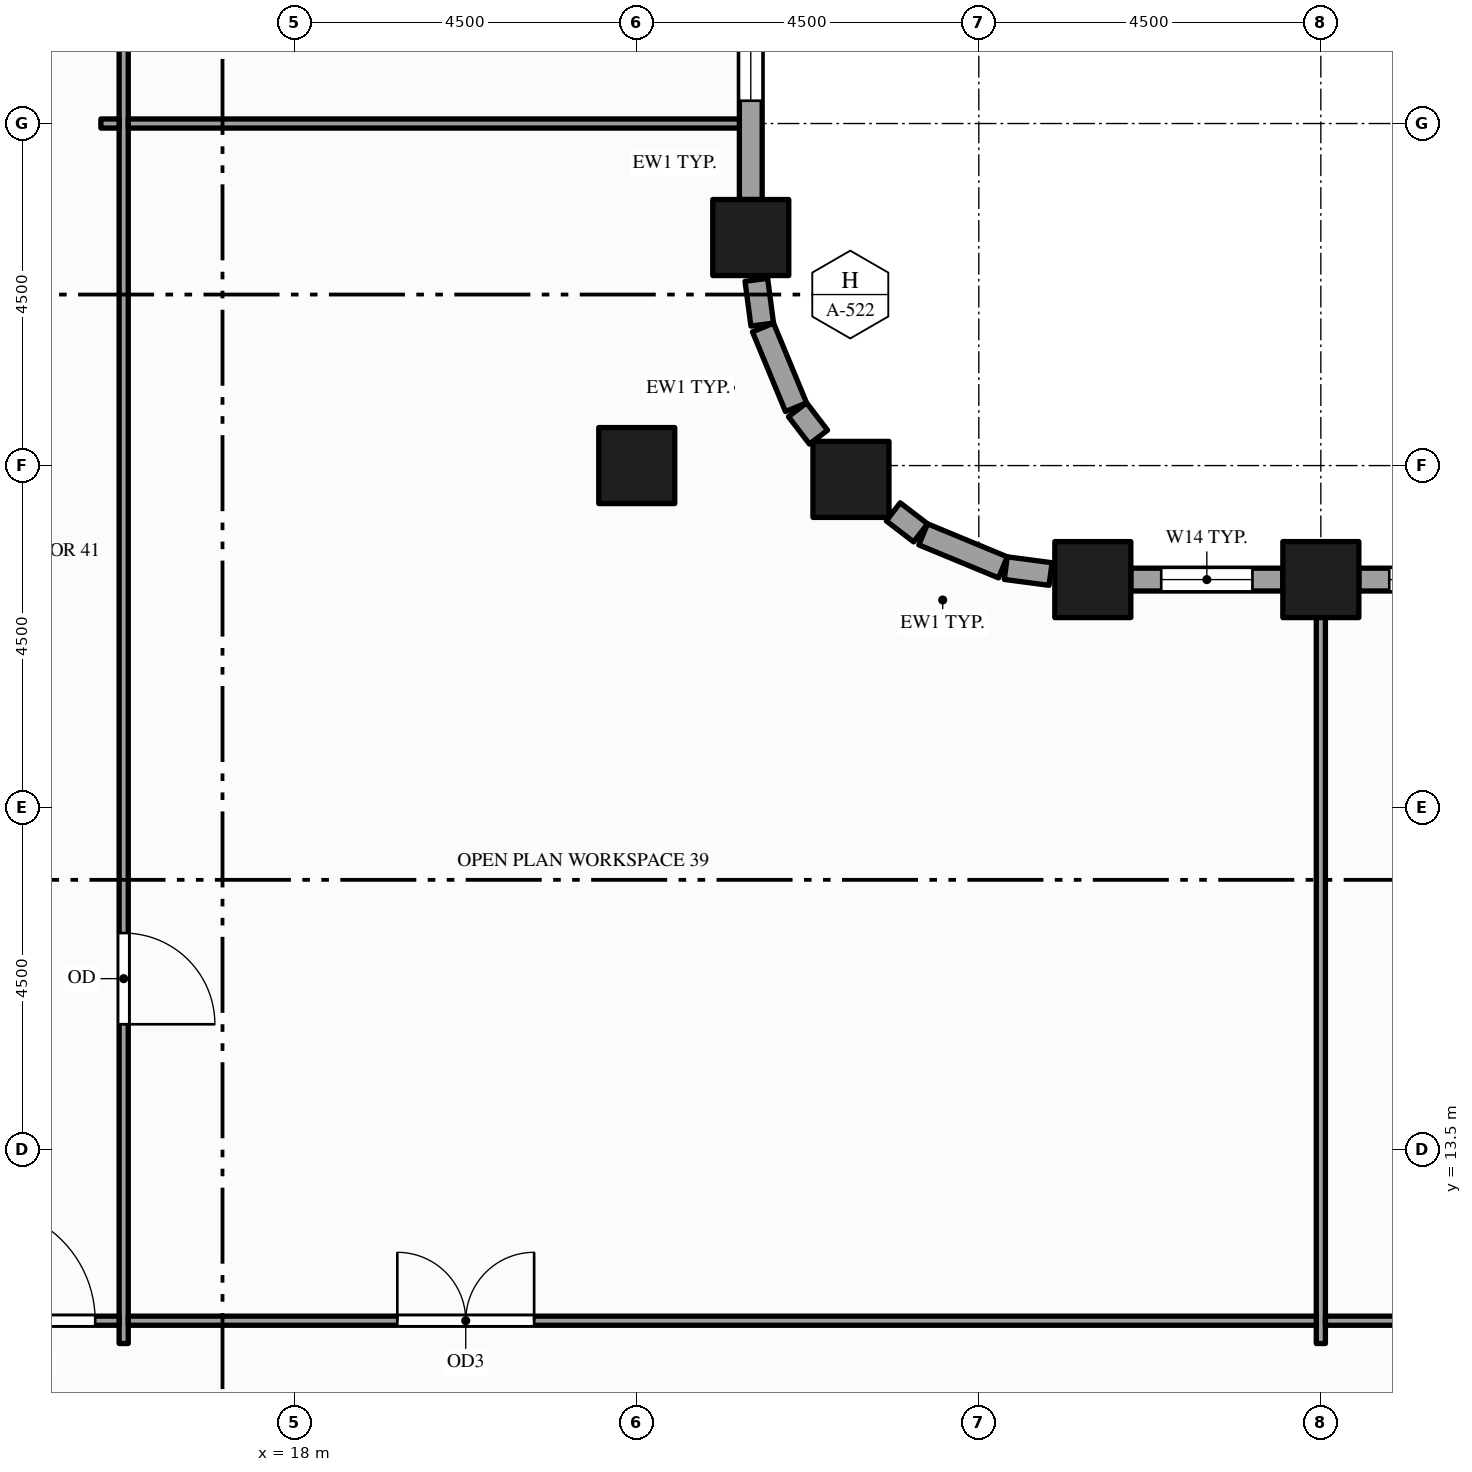
"""IFC4 building model, lengths in metres.
Left out: names, types, materials, properties, quantities, classifications, styles, units other than length and angle.
Written with IfcOpenShell. Run it as: python <this file> out.ifc"""

import sys

from ifc_helpers import new_model, si_unit, direction, frame, frame_2d, origin, origin_2d, place, context, subcontext, project, spatial, rectangle, hollow_rectangle, extrude, element, fill, save


model = new_model("IFC4")
c1 = context("Model", 3, precision=1e-05, world=origin(), true_north=direction((0.0, 1.0)))
c2 = subcontext(c1, "Body", "Model", "MODEL_VIEW")
j1 = project(units=[si_unit("LENGTHUNIT", "METRE"), si_unit("PLANEANGLEUNIT", "RADIAN")], contexts=[c1])
p1 = place(None, origin())
s1 = spatial("IfcSite", under=j1, at=p1, CompositionType="ELEMENT")
p2 = place(p1, origin())
s2 = spatial("IfcBuilding", under=s1, at=p2, CompositionType="ELEMENT")
p3 = place(p2, frame((0.0, 0.0, 115.0)))
s3 = spatial("IfcBuildingStorey", under=s2, at=p3, CompositionType="ELEMENT", Elevation=115.0)
for number, where, z_axis, x_axis in (
    (1, (22.5, 22.5, -0.15), (0.0, 0.0, 1.0), (1.0, 0.0, 0.0)),
    (2, (24.0, 25.5, -0.15), (0.0, 0.0, 1.0), (1.0, 0.0, 0.0)),
    (3, (25.318, 22.318, -0.15), (0.0, 0.0, 1.0), (1.0, 0.0, 0.0)),
    (4, (28.5, 21.0, -0.15), (0.0, 0.0, 1.0), (1.0, 0.0, 0.0)),
    (5, (31.5, 21.0, -0.15), (0.0, 0.0, 1.0), (1.0, 0.0, 0.0)),
):
    element("IfcColumn", number, at=place(p3, frame(where, z_axis=z_axis, x_axis=x_axis)), inside=s3, PredefinedType="COLUMN", context=c2, shape_type="SweptSolid", body=[
        extrude(hollow_rectangle(XDim=1.0, YDim=1.0, WallThickness=0.05, at=origin_2d()), origin(), (0.0, 0.0, 1.0), 4.0),
    ])
p4 = place(p3, frame((35.5, 21.0, 0.0), z_axis=(0.0, 0.0, 1.0), x_axis=(-1.0, 0.0, 0.0)))
e6 = element("IfcWall", 6, at=p4, inside=s3, PredefinedType="STANDARD", context=c2, shape_type="SweptSolid", body=[
    extrude(rectangle(XDim=3.5, YDim=0.3, at=frame_2d((1.75, 0.0))), origin(), (0.0, 0.0, 1.0), 3.154),
])
p5 = place(p4, frame((0.4, 0.0, 0.9)))
e7 = element("IfcOpeningElement", 7, at=p5, cuts=e6, PredefinedType="OPENING", context=c2, shape_type="SweptSolid", body=[
    extrude(rectangle(XDim=1.05, YDim=2.0, at=frame_2d((0.525, 1.0))), frame((0.0, 0.16, 0.0), z_axis=(0.0, -1.0, 0.0), x_axis=(1.0, 0.0, 0.0)), (0.0, 0.0, 1.0), 0.32),
])
p6 = place(p4, frame((2.05, 0.0, 0.9)))
e8 = element("IfcOpeningElement", 8, at=p6, cuts=e6, PredefinedType="OPENING", context=c2, shape_type="SweptSolid", body=[
    extrude(rectangle(XDim=1.05, YDim=2.0, at=frame_2d((0.525, 1.0))), frame((0.0, 0.16, 0.0), z_axis=(0.0, -1.0, 0.0), x_axis=(1.0, 0.0, 0.0)), (0.0, 0.0, 1.0), 0.32),
])
p7 = place(p3, frame((31.0, 21.0, 0.0), z_axis=(0.0, 0.0, 1.0), x_axis=(-1.0, 0.0, 0.0)))
e9 = element("IfcWall", 9, at=p7, inside=s3, PredefinedType="STANDARD", context=c2, shape_type="SweptSolid", body=[
    extrude(rectangle(XDim=2.0, YDim=0.3, at=frame_2d((1.0, 0.0))), origin(), (0.0, 0.0, 1.0), 3.154),
])
p8 = place(p7, frame((0.4, 0.0, 0.9)))
e10 = element("IfcOpeningElement", 10, at=p8, cuts=e9, PredefinedType="OPENING", context=c2, shape_type="SweptSolid", body=[
    extrude(rectangle(XDim=1.2, YDim=2.0, at=frame_2d((0.6, 1.0))), frame((0.0, 0.16, 0.0), z_axis=(0.0, -1.0, 0.0), x_axis=(1.0, 0.0, 0.0)), (0.0, 0.0, 1.0), 0.32),
])
p9 = place(p3, frame((27.944, 21.073, 0.0), z_axis=(0.0, 0.0, 1.0), x_axis=(-0.991420685839, 0.130709692412, 0.0)))
e11 = element("IfcWall", 11, at=p9, inside=s3, PredefinedType="STANDARD", context=c2, shape_type="SweptSolid", body=[
    extrude(rectangle(XDim=0.594, YDim=0.3, at=frame_2d((0.297, 0.0))), origin(), (0.0, 0.0, 1.0), 3.154),
])
p10 = place(p3, frame((27.317, 21.161, 0.0), z_axis=(0.0, 0.0, 1.0), x_axis=(-0.923914616768, 0.382598720491, 0.0)))
e12 = element("IfcWall", 12, at=p10, inside=s3, PredefinedType="STANDARD", context=c2, shape_type="SweptSolid", body=[
    extrude(rectangle(XDim=1.135, YDim=0.3, at=frame_2d((0.568, 0.0))), origin(), (0.0, 0.0, 1.0), 2.938),
])
p11 = place(p3, frame((26.234, 21.615, 0.0), z_axis=(0.0, 0.0, 1.0), x_axis=(-0.793563062559, 0.608488016104, 0.0)))
e13 = element("IfcWall", 13, at=p11, inside=s3, PredefinedType="STANDARD", context=c2, shape_type="SweptSolid", body=[
    extrude(rectangle(XDim=0.454, YDim=0.3, at=frame_2d((0.227, 0.0))), origin(), (0.0, 0.0, 1.0), 3.154),
])
p12 = place(p3, frame((24.891, 22.874, 0.0), z_axis=(0.0, 0.0, 1.0), x_axis=(-0.608488016104, 0.793563062559, 0.0)))
e14 = element("IfcWall", 14, at=p12, inside=s3, PredefinedType="STANDARD", context=c2, shape_type="SweptSolid", body=[
    extrude(rectangle(XDim=0.454, YDim=0.3, at=frame_2d((0.227, 0.0))), origin(), (0.0, 0.0, 1.0), 2.76),
])
p13 = place(p3, frame((24.595, 23.268, 0.0), z_axis=(0.0, 0.0, 1.0), x_axis=(-0.382598720491, 0.923914616768, 0.0)))
e15 = element("IfcWall", 15, at=p13, inside=s3, PredefinedType="STANDARD", context=c2, shape_type="SweptSolid", body=[
    extrude(rectangle(XDim=1.135, YDim=0.3, at=frame_2d((0.568, 0.0))), origin(), (0.0, 0.0, 1.0), 3.154),
])
p14 = place(p3, frame((24.151, 24.355, 0.0), z_axis=(0.0, 0.0, 1.0), x_axis=(-0.130709692412, 0.991420685839, 0.0)))
e16 = element("IfcWall", 16, at=p14, inside=s3, PredefinedType="STANDARD", context=c2, shape_type="SweptSolid", body=[
    extrude(rectangle(XDim=0.594, YDim=0.3, at=frame_2d((0.297, 0.0))), origin(), (0.0, 0.0, 1.0), 3.154),
])
p15 = place(p3, frame((24.0, 26.0, 0.0), z_axis=(0.0, 0.0, 1.0), x_axis=(0.0, 1.0, 0.0)))
e17 = element("IfcWall", 17, at=p15, inside=s3, PredefinedType="STANDARD", context=c2, shape_type="SweptSolid", body=[
    extrude(rectangle(XDim=5.0, YDim=0.3, at=frame_2d((2.5, 0.0))), origin(), (0.0, 0.0, 1.0), 3.154),
])
p16 = place(p15, frame((1.3, 0.0, 0.9)))
e18 = element("IfcOpeningElement", 18, at=p16, cuts=e17, PredefinedType="OPENING", context=c2, shape_type="SweptSolid", body=[
    extrude(rectangle(XDim=1.65, YDim=2.0, at=frame_2d((0.825, 1.0))), frame((0.0, 0.16, 0.0), z_axis=(0.0, -1.0, 0.0), x_axis=(1.0, 0.0, 0.0)), (0.0, 0.0, 1.0), 0.32),
])
p17 = place(p15, frame((3.55, 0.0, 0.9)))
e19 = element("IfcOpeningElement", 19, at=p17, cuts=e17, PredefinedType="OPENING", context=c2, shape_type="SweptSolid", body=[
    extrude(rectangle(XDim=1.05, YDim=2.0, at=frame_2d((0.525, 1.0))), frame((0.0, 0.16, 0.0), z_axis=(0.0, -1.0, 0.0), x_axis=(1.0, 0.0, 0.0)), (0.0, 0.0, 1.0), 0.32),
])
p18 = place(p3, frame((15.75, 10.95, 0.0), z_axis=(0.0, 0.0, 1.0), x_axis=(0.0, 1.0, 0.0)))
e20 = element("IfcWall", 20, at=p18, inside=s3, PredefinedType="PARTITIONING", context=c2, shape_type="SweptSolid", body=[
    extrude(rectangle(XDim=20.85, YDim=0.12, at=frame_2d((10.425, 0.0))), origin(), (0.0, 0.0, 1.0), 2.6),
])
p19 = place(p18, frame((17.8, 0.0, 0.0)))
e21 = element("IfcOpeningElement", 21, at=p19, cuts=e20, PredefinedType="OPENING", context=c2, shape_type="SweptSolid", body=[
    extrude(rectangle(XDim=1.0, YDim=2.1, at=frame_2d((0.5, 1.05))), frame((0.0, 0.07, 0.0), z_axis=(0.0, -1.0, 0.0), x_axis=(1.0, 0.0, 0.0)), (0.0, 0.0, 1.0), 0.14),
])
p20 = place(p18, frame((4.2, 0.0, 0.0)))
e22 = element("IfcOpeningElement", 22, at=p20, cuts=e20, PredefinedType="OPENING", context=c2, shape_type="SweptSolid", body=[
    extrude(rectangle(XDim=1.2, YDim=2.1, at=frame_2d((0.6, 1.05))), frame((0.0, 0.07, 0.0), z_axis=(0.0, -1.0, 0.0), x_axis=(1.0, 0.0, 0.0)), (0.0, 0.0, 1.0), 0.14),
])
p21 = place(p3, frame((31.5, 10.95, 0.0), z_axis=(0.0, 0.0, 1.0), x_axis=(0.0, 1.0, 0.0)))
e23 = element("IfcWall", 23, at=p21, inside=s3, PredefinedType="PARTITIONING", context=c2, shape_type="SweptSolid", body=[
    extrude(rectangle(XDim=9.9, YDim=0.12, at=frame_2d((4.95, 0.0))), origin(), (0.0, 0.0, 1.0), 2.938),
])
p22 = place(p3, frame((13.56, 11.25, 0.0), z_axis=(0.0, 0.0, 1.0), x_axis=(1.0, 0.0, 0.0)))
e24 = element("IfcWall", 24, at=p22, inside=s3, PredefinedType="PARTITIONING", context=c2, shape_type="SweptSolid", body=[
    extrude(rectangle(XDim=2.13, YDim=0.12, at=frame_2d((1.065, 0.0))), origin(), (0.0, 0.0, 1.0), 2.938),
])
p23 = place(p22, frame((0.315, 0.0, 0.0)))
e25 = element("IfcOpeningElement", 25, at=p23, cuts=e24, PredefinedType="OPENING", context=c2, shape_type="SweptSolid", body=[
    extrude(rectangle(XDim=1.5, YDim=2.1, at=frame_2d((0.75, 1.05))), frame((0.0, 0.07, 0.0), z_axis=(0.0, -1.0, 0.0), x_axis=(1.0, 0.0, 0.0)), (0.0, 0.0, 1.0), 0.14),
])
p24 = place(p3, frame((15.81, 11.25, 0.0), z_axis=(0.0, 0.0, 1.0), x_axis=(1.0, 0.0, 0.0)))
e26 = element("IfcWall", 26, at=p24, inside=s3, PredefinedType="PARTITIONING", context=c2, shape_type="SweptSolid", body=[
    extrude(rectangle(XDim=15.63, YDim=0.12, at=frame_2d((7.815, 0.0))), origin(), (0.0, 0.0, 1.0), 2.76),
])
p25 = place(p24, frame((3.54, 0.0, 0.0)))
e27 = element("IfcOpeningElement", 27, at=p25, cuts=e26, PredefinedType="OPENING", context=c2, shape_type="SweptSolid", body=[
    extrude(rectangle(XDim=1.8, YDim=2.1, at=frame_2d((0.9, 1.05))), frame((0.0, 0.07, 0.0), z_axis=(0.0, -1.0, 0.0), x_axis=(1.0, 0.0, 0.0)), (0.0, 0.0, 1.0), 0.14),
])
p26 = place(p3, frame((31.56, 11.25, 0.0), z_axis=(0.0, 0.0, 1.0), x_axis=(1.0, 0.0, 0.0)))
e28 = element("IfcWall", 28, at=p26, inside=s3, PredefinedType="PARTITIONING", context=c2, shape_type="SweptSolid", body=[
    extrude(rectangle(XDim=4.38, YDim=0.12, at=frame_2d((2.19, 0.0))), origin(), (0.0, 0.0, 1.0), 2.938),
])
p27 = place(p26, frame((1.59, 0.0, 0.0)))
e29 = element("IfcOpeningElement", 29, at=p27, cuts=e28, PredefinedType="OPENING", context=c2, shape_type="SweptSolid", body=[
    extrude(rectangle(XDim=1.2, YDim=2.1, at=frame_2d((0.6, 1.05))), frame((0.0, 0.07, 0.0), z_axis=(0.0, -1.0, 0.0), x_axis=(1.0, 0.0, 0.0)), (0.0, 0.0, 1.0), 0.14),
])
p28 = place(p3, frame((15.45, 27.0, 0.0), z_axis=(0.0, 0.0, 1.0), x_axis=(1.0, 0.0, 0.0)))
e30 = element("IfcWall", 30, at=p28, inside=s3, PredefinedType="PARTITIONING", context=c2, shape_type="SweptSolid", body=[
    extrude(rectangle(XDim=0.24, YDim=0.12, at=frame_2d((0.12, 0.0))), origin(), (0.0, 0.0, 1.0), 2.938),
])
p29 = place(p3, frame((15.81, 27.0, 0.0), z_axis=(0.0, 0.0, 1.0), x_axis=(1.0, 0.0, 0.0)))
e31 = element("IfcWall", 31, at=p29, inside=s3, PredefinedType="PARTITIONING", context=c2, shape_type="SweptSolid", body=[
    extrude(rectangle(XDim=8.04, YDim=0.12, at=frame_2d((4.02, 0.0))), origin(), (0.0, 0.0, 1.0), 2.938),
])
p30 = place(p6, origin())
e32 = element("IfcWindow", 32, at=p30, inside=s3, PartitioningType="SINGLE_PANEL", PredefinedType="WINDOW", context=c2, shape_type="SweptSolid", body=[
    extrude(rectangle(XDim=1.05, YDim=2.0, at=frame_2d((0.525, 1.0))), frame((0.0, 0.03, 0.0), z_axis=(0.0, -1.0, 0.0), x_axis=(1.0, 0.0, 0.0)), (0.0, 0.0, 1.0), 0.06),
])
fill(e8, e32)
p31 = place(p8, origin())
e33 = element("IfcWindow", 33, at=p31, inside=s3, PartitioningType="SINGLE_PANEL", PredefinedType="WINDOW", context=c2, shape_type="SweptSolid", body=[
    extrude(rectangle(XDim=1.2, YDim=2.0, at=frame_2d((0.6, 1.0))), frame((0.0, 0.03, 0.0), z_axis=(0.0, -1.0, 0.0), x_axis=(1.0, 0.0, 0.0)), (0.0, 0.0, 1.0), 0.06),
])
fill(e10, e33)
p32 = place(p16, origin())
e34 = element("IfcWindow", 34, at=p32, inside=s3, PartitioningType="SINGLE_PANEL", PredefinedType="WINDOW", context=c2, shape_type="SweptSolid", body=[
    extrude(rectangle(XDim=1.65, YDim=2.0, at=frame_2d((0.825, 1.0))), frame((0.0, 0.03, 0.0), z_axis=(0.0, -1.0, 0.0), x_axis=(1.0, 0.0, 0.0)), (0.0, 0.0, 1.0), 0.06),
])
fill(e18, e34)
p33 = place(p25, origin())
e35 = element("IfcDoor", 35, at=p33, inside=s3, OperationType="DOUBLE_DOOR_SINGLE_SWING", PredefinedType="DOOR", context=c2, shape_type="SweptSolid", body=[
    extrude(rectangle(XDim=1.8, YDim=2.1, at=frame_2d((0.9, 1.05))), frame((0.0, 0.025, 0.0), z_axis=(0.0, -1.0, 0.0), x_axis=(1.0, 0.0, 0.0)), (0.0, 0.0, 1.0), 0.05),
])
fill(e27, e35)
p34 = place(p23, origin())
e36 = element("IfcDoor", 36, at=p34, inside=s3, OperationType="SINGLE_SWING_LEFT", PredefinedType="DOOR", context=c2, shape_type="SweptSolid", body=[
    extrude(rectangle(XDim=1.5, YDim=2.1, at=frame_2d((0.75, 1.05))), frame((0.0, 0.025, 0.0), z_axis=(0.0, -1.0, 0.0), x_axis=(1.0, 0.0, 0.0)), (0.0, 0.0, 1.0), 0.05),
])
fill(e25, e36)
p35 = place(p20, origin())
e37 = element("IfcDoor", 37, at=p35, inside=s3, OperationType="SINGLE_SWING_LEFT", PredefinedType="DOOR", context=c2, shape_type="SweptSolid", body=[
    extrude(rectangle(XDim=1.2, YDim=2.1, at=frame_2d((0.6, 1.05))), frame((0.0, 0.025, 0.0), z_axis=(0.0, -1.0, 0.0), x_axis=(1.0, 0.0, 0.0)), (0.0, 0.0, 1.0), 0.05),
])
fill(e22, e37)
save(model, sys.argv[1])
